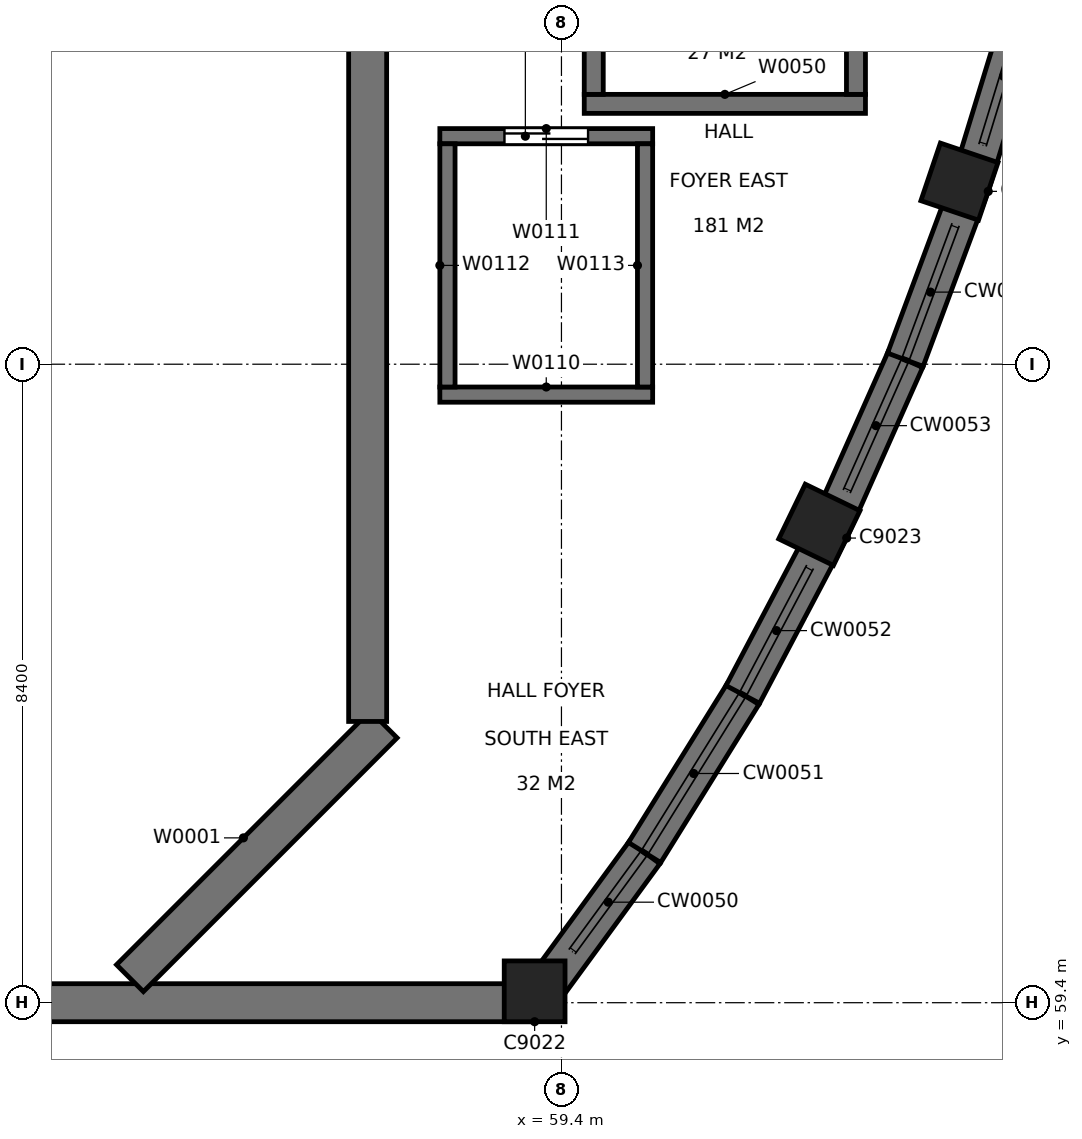
"""IFC4 building model, lengths in metres.
Left out: names, types, materials, properties, quantities, classifications, styles, units other than length and angle.
Written with IfcOpenShell. Run it as: python <this file> out.ifc"""

import sys

from ifc_helpers import new_model, si_unit, direction, frame, frame_2d, origin, origin_2d, place, context, subcontext, project, spatial, rectangle, extrude, element, fill, save


model = new_model("IFC4")
c1 = context("Model", 3, precision=1e-05, world=origin(), true_north=direction((0.0, 1.0)))
c2 = subcontext(c1, "Body", "Model", "MODEL_VIEW")
j1 = project(units=[si_unit("LENGTHUNIT", "METRE"), si_unit("PLANEANGLEUNIT", "RADIAN")], contexts=[c1])
p1 = place(None, origin())
s1 = spatial("IfcSite", under=j1, at=p1, CompositionType="ELEMENT")
p2 = place(p1, origin())
s2 = spatial("IfcBuilding", under=s1, at=p2, CompositionType="ELEMENT")
p3 = place(p2, frame((0.0, 0.0, 14.4)))
s3 = spatial("IfcBuildingStorey", under=s2, at=p3, CompositionType="ELEMENT", Elevation=14.4)
p4 = place(p3, frame((26.153, 59.4, 0.0), z_axis=(0.0, 0.0, 1.0), x_axis=(1.0, 0.0, 0.0)))
e1 = element("IfcWall", 1, at=p4, inside=s3, PredefinedType="SOLIDWALL", context=c2, shape_type="SweptSolid", body=[
    extrude(rectangle(XDim=32.894, YDim=0.5, at=frame_2d((16.447, 0.0))), origin(), (0.0, 0.0, 1.0), 4.8),
])
p5 = place(p3, frame((59.047, 59.4, 0.0), z_axis=(0.0, 0.0, 1.0), x_axis=(0.590771306399, 0.806839056774, 0.0)))
e2 = element("IfcWall", 2, at=p5, inside=s3, PredefinedType="SOLIDWALL", context=c2, shape_type="SweptSolid", body=[
    extrude(rectangle(XDim=2.448, YDim=0.5, at=frame_2d((1.224, 0.0))), origin(), (0.0, 0.0, 1.0), 4.8),
])
p6 = place(p5, frame((0.83, 0.0, 0.6)))
e3 = element("IfcOpeningElement", 3, at=p6, cuts=e2, PredefinedType="OPENING", context=c2, shape_type="SweptSolid", body=[
    extrude(rectangle(XDim=1.619, YDim=2.4, at=frame_2d((0.81, 1.2))), frame((0.0, 0.26, 0.0), z_axis=(0.0, -1.0, 0.0), x_axis=(1.0, 0.0, 0.0)), (0.0, 0.0, 1.0), 0.52),
])
p7 = place(p3, frame((60.494, 61.375, 0.0), z_axis=(0.0, 0.0, 1.0), x_axis=(0.527702820527, 0.849429063082, 0.0)))
e4 = element("IfcWall", 4, at=p7, inside=s3, PredefinedType="SOLIDWALL", context=c2, shape_type="SweptSolid", body=[
    extrude(rectangle(XDim=2.449, YDim=0.5, at=frame_2d((1.224, 0.0))), origin(), (0.0, 0.0, 1.0), 4.8),
])
p8 = place(p7, frame((0.0, 0.0, 0.6)))
e5 = element("IfcOpeningElement", 5, at=p8, cuts=e4, PredefinedType="OPENING", context=c2, shape_type="SweptSolid", body=[
    extrude(rectangle(XDim=2.449, YDim=2.4, at=frame_2d((1.224, 1.2))), frame((0.0, 0.26, 0.0), z_axis=(0.0, -1.0, 0.0), x_axis=(1.0, 0.0, 0.0)), (0.0, 0.0, 1.0), 0.52),
])
p9 = place(p3, frame((61.786, 63.456, 0.0), z_axis=(0.0, 0.0, 1.0), x_axis=(0.466448872517, 0.884548161112, 0.0)))
e6 = element("IfcWall", 6, at=p9, inside=s3, PredefinedType="SOLIDWALL", context=c2, shape_type="SweptSolid", body=[
    extrude(rectangle(XDim=2.449, YDim=0.5, at=frame_2d((1.225, 0.0))), origin(), (0.0, 0.0, 1.0), 4.8),
])
p10 = place(p9, frame((0.0, 0.0, 0.6)))
e7 = element("IfcOpeningElement", 7, at=p10, cuts=e6, PredefinedType="OPENING", context=c2, shape_type="SweptSolid", body=[
    extrude(rectangle(XDim=1.899, YDim=2.4, at=frame_2d((0.949, 1.2))), frame((0.0, 0.26, 0.0), z_axis=(0.0, -1.0, 0.0), x_axis=(1.0, 0.0, 0.0)), (0.0, 0.0, 1.0), 0.52),
])
p11 = place(p3, frame((62.928, 65.622, 0.0), z_axis=(0.0, 0.0, 1.0), x_axis=(0.406767391574, 0.913531766909, 0.0)))
e8 = element("IfcWall", 8, at=p11, inside=s3, PredefinedType="SOLIDWALL", context=c2, shape_type="SweptSolid", body=[
    extrude(rectangle(XDim=2.449, YDim=0.5, at=frame_2d((1.224, 0.0))), origin(), (0.0, 0.0, 1.0), 4.8),
])
p12 = place(p11, frame((0.55, 0.0, 0.6)))
e9 = element("IfcOpeningElement", 9, at=p12, cuts=e8, PredefinedType="OPENING", context=c2, shape_type="SweptSolid", body=[
    extrude(rectangle(XDim=1.898, YDim=2.4, at=frame_2d((0.949, 1.2))), frame((0.0, 0.26, 0.0), z_axis=(0.0, -1.0, 0.0), x_axis=(1.0, 0.0, 0.0)), (0.0, 0.0, 1.0), 0.52),
])
p13 = place(p3, frame((63.924, 67.859, 0.0), z_axis=(0.0, 0.0, 1.0), x_axis=(0.348817204426, 0.937190779882, 0.0)))
e10 = element("IfcWall", 10, at=p13, inside=s3, PredefinedType="SOLIDWALL", context=c2, shape_type="SweptSolid", body=[
    extrude(rectangle(XDim=2.449, YDim=0.5, at=frame_2d((1.225, 0.0))), origin(), (0.0, 0.0, 1.0), 4.8),
])
p14 = place(p13, frame((0.0, 0.0, 0.6)))
e11 = element("IfcOpeningElement", 11, at=p14, cuts=e10, PredefinedType="OPENING", context=c2, shape_type="SweptSolid", body=[
    extrude(rectangle(XDim=1.899, YDim=2.4, at=frame_2d((0.949, 1.2))), frame((0.0, 0.26, 0.0), z_axis=(0.0, -1.0, 0.0), x_axis=(1.0, 0.0, 0.0)), (0.0, 0.0, 1.0), 0.52),
])
p15 = place(p3, frame((64.779, 70.154, 0.0), z_axis=(0.0, 0.0, 1.0), x_axis=(0.29250219685, 0.95626485078, 0.0)))
e12 = element("IfcWall", 12, at=p15, inside=s3, PredefinedType="SOLIDWALL", context=c2, shape_type="SweptSolid", body=[
    extrude(rectangle(XDim=2.449, YDim=0.5, at=frame_2d((1.225, 0.0))), origin(), (0.0, 0.0, 1.0), 4.8),
])
p16 = place(p15, frame((0.55, 0.0, 0.6)))
e13 = element("IfcOpeningElement", 13, at=p16, cuts=e12, PredefinedType="OPENING", context=c2, shape_type="SweptSolid", body=[
    extrude(rectangle(XDim=1.899, YDim=2.4, at=frame_2d((0.949, 1.2))), frame((0.0, 0.26, 0.0), z_axis=(0.0, -1.0, 0.0), x_axis=(1.0, 0.0, 0.0)), (0.0, 0.0, 1.0), 0.52),
])
for number, where, z_axis, x_axis in (
    (14, (59.047, 59.55, 0.0), (0.0, 0.0, 1.0), (1.0, 0.0, 0.0)),
    (15, (62.793, 65.687, 0.0), (0.0, 0.0, 1.0), (0.436, 0.9, 0.0)),
    (16, (64.636, 70.202, 0.0), (0.0, 0.0, 1.0), (0.32, 0.947, 0.0)),
):
    element("IfcColumn", number, at=place(p3, frame(where, z_axis=z_axis, x_axis=x_axis)), inside=s3, PredefinedType="COLUMN", context=c2, shape_type="SweptSolid", body=[
        extrude(rectangle(XDim=0.8, YDim=0.8, at=origin_2d()), origin(), (0.0, 0.0, 1.0), 4.8),
    ])
p17 = place(p3, frame((53.723, 59.723, 0.0), z_axis=(0.0, 0.0, 1.0), x_axis=(0.707106781187, 0.707106781187, 0.0)))
e17 = element("IfcWall", 17, at=p17, inside=s3, PredefinedType="SOLIDWALL", context=c2, shape_type="SweptSolid", body=[
    extrude(rectangle(XDim=4.721, YDim=0.5, at=frame_2d((2.36, 0.0))), origin(), (0.0, 0.0, 1.0), 4.8),
])
p18 = place(p3, frame((56.85, 63.1, 0.0), z_axis=(0.0, 0.0, 1.0), x_axis=(0.0, 1.0, 0.0)))
e18 = element("IfcWall", 18, at=p18, inside=s3, PredefinedType="SOLIDWALL", context=c2, shape_type="SweptSolid", body=[
    extrude(rectangle(XDim=38.151, YDim=0.5, at=frame_2d((19.076, 0.0))), origin(), (0.0, 0.0, 1.0), 4.8),
])
p19 = place(p18, frame((33.25, 0.0, 0.0), z_axis=(0.0, 0.0, 1.0), x_axis=(-1.0, 0.0, 0.0)))
e19 = element("IfcOpeningElement", 19, at=p19, cuts=e18, PredefinedType="OPENING", context=c2, shape_type="SweptSolid", body=[
    extrude(rectangle(XDim=1.0, YDim=2.1, at=frame_2d((0.5, 1.05))), frame((0.0, 0.26, 0.0), z_axis=(0.0, -1.0, 0.0), x_axis=(1.0, 0.0, 0.0)), (0.0, 0.0, 1.0), 0.52),
])
p20 = place(p3, frame((59.7, 71.225, 0.0), z_axis=(0.0, 0.0, 1.0), x_axis=(1.0, 0.0, 0.0)))
e20 = element("IfcWall", 20, at=p20, inside=s3, PredefinedType="SOLIDWALL", context=c2, shape_type="SweptSolid", body=[
    extrude(rectangle(XDim=3.7, YDim=0.25, at=frame_2d((1.85, 0.0))), origin(), (0.0, 0.0, 1.0), 4.8),
])
p21 = place(p3, frame((59.825, 71.35, 0.0), z_axis=(0.0, 0.0, 1.0), x_axis=(0.0, 1.0, 0.0)))
e21 = element("IfcWall", 21, at=p21, inside=s3, PredefinedType="SOLIDWALL", context=c2, shape_type="SweptSolid", body=[
    extrude(rectangle(XDim=6.9, YDim=0.25, at=frame_2d((3.45, 0.0))), origin(), (0.0, 0.0, 1.0), 4.8),
])
p22 = place(p3, frame((63.275, 71.35, 0.0), z_axis=(0.0, 0.0, 1.0), x_axis=(0.0, 1.0, 0.0)))
e22 = element("IfcWall", 22, at=p22, inside=s3, PredefinedType="SOLIDWALL", context=c2, shape_type="SweptSolid", body=[
    extrude(rectangle(XDim=6.9, YDim=0.25, at=frame_2d((3.45, 0.0))), origin(), (0.0, 0.0, 1.0), 4.8),
])
p23 = place(p22, frame((5.15, 0.0, 0.0)))
e23 = element("IfcOpeningElement", 23, at=p23, cuts=e22, PredefinedType="OPENING", context=c2, shape_type="SweptSolid", body=[
    extrude(rectangle(XDim=1.2, YDim=2.1, at=frame_2d((0.6, 1.05))), frame((0.0, 0.135, 0.0), z_axis=(0.0, -1.0, 0.0), x_axis=(1.0, 0.0, 0.0)), (0.0, 0.0, 1.0), 0.27),
])
p24 = place(p3, frame((57.8, 67.4, 0.0), z_axis=(0.0, 0.0, 1.0), x_axis=(1.0, 0.0, 0.0)))
e24 = element("IfcWall", 24, at=p24, inside=s3, PredefinedType="SOLIDWALL", context=c2, shape_type="SweptSolid", body=[
    extrude(rectangle(XDim=2.8, YDim=0.2, at=frame_2d((1.4, 0.0))), origin(), (0.0, 0.0, 1.0), 4.8),
])
p25 = place(p3, frame((57.8, 70.8, 0.0), z_axis=(0.0, 0.0, 1.0), x_axis=(1.0, 0.0, 0.0)))
e25 = element("IfcWall", 25, at=p25, inside=s3, PredefinedType="SOLIDWALL", context=c2, shape_type="SweptSolid", body=[
    extrude(rectangle(XDim=2.8, YDim=0.2, at=frame_2d((1.4, 0.0))), origin(), (0.0, 0.0, 1.0), 4.8),
])
p26 = place(p25, frame((0.85, 0.0, 0.0)))
e26 = element("IfcOpeningElement", 26, at=p26, cuts=e25, PredefinedType="OPENING", context=c2, shape_type="SweptSolid", body=[
    extrude(rectangle(XDim=1.1, YDim=2.1, at=frame_2d((0.55, 1.05))), frame((0.0, 0.11, 0.0), z_axis=(0.0, -1.0, 0.0), x_axis=(1.0, 0.0, 0.0)), (0.0, 0.0, 1.0), 0.22),
])
for number, where, z_axis, x_axis in (
    (27, (57.9, 67.5, 0.0), (0.0, 0.0, 1.0), (0.0, 1.0, 0.0)),
    (28, (60.5, 67.5, 0.0), (0.0, 0.0, 1.0), (0.0, 1.0, 0.0)),
):
    element("IfcWall", number, at=place(p3, frame(where, z_axis=z_axis, x_axis=x_axis)), inside=s3, PredefinedType="SOLIDWALL", context=c2, shape_type="SweptSolid", body=[
        extrude(rectangle(XDim=3.2, YDim=0.2, at=frame_2d((1.6, 0.0))), origin(), (0.0, 0.0, 1.0), 4.8),
    ])
p27 = place(p2, frame((0.0, 0.0, 4.8)))
s4 = spatial("IfcBuildingStorey", under=s2, at=p27, CompositionType="ELEMENT", Elevation=4.8)
p28 = place(p27, frame((28.6, 71.4, 0.0), z_axis=(0.0, 0.0, 1.0), x_axis=(1.0, 0.0, 0.0)))
e29 = element("IfcWall", 29, at=p28, inside=s4, PredefinedType="PARTITIONING", context=c2, shape_type="SweptSolid", body=[
    extrude(rectangle(XDim=28.0, YDim=0.25, at=frame_2d((14.0, 0.0))), origin(), (0.0, 0.0, 1.0), 21.25),
])
p29 = place(p26, origin())
e30 = element("IfcDoor", 30, at=p29, inside=s3, OperationType="SLIDING_TO_LEFT", PredefinedType="DOOR", context=c2, shape_type="SweptSolid", body=[
    extrude(rectangle(XDim=1.1, YDim=2.1, at=frame_2d((0.55, 1.05))), frame((0.0, 0.025, 0.0), z_axis=(0.0, -1.0, 0.0), x_axis=(1.0, 0.0, 0.0)), (0.0, 0.0, 1.0), 0.05),
])
fill(e26, e30)
save(model, sys.argv[1])
